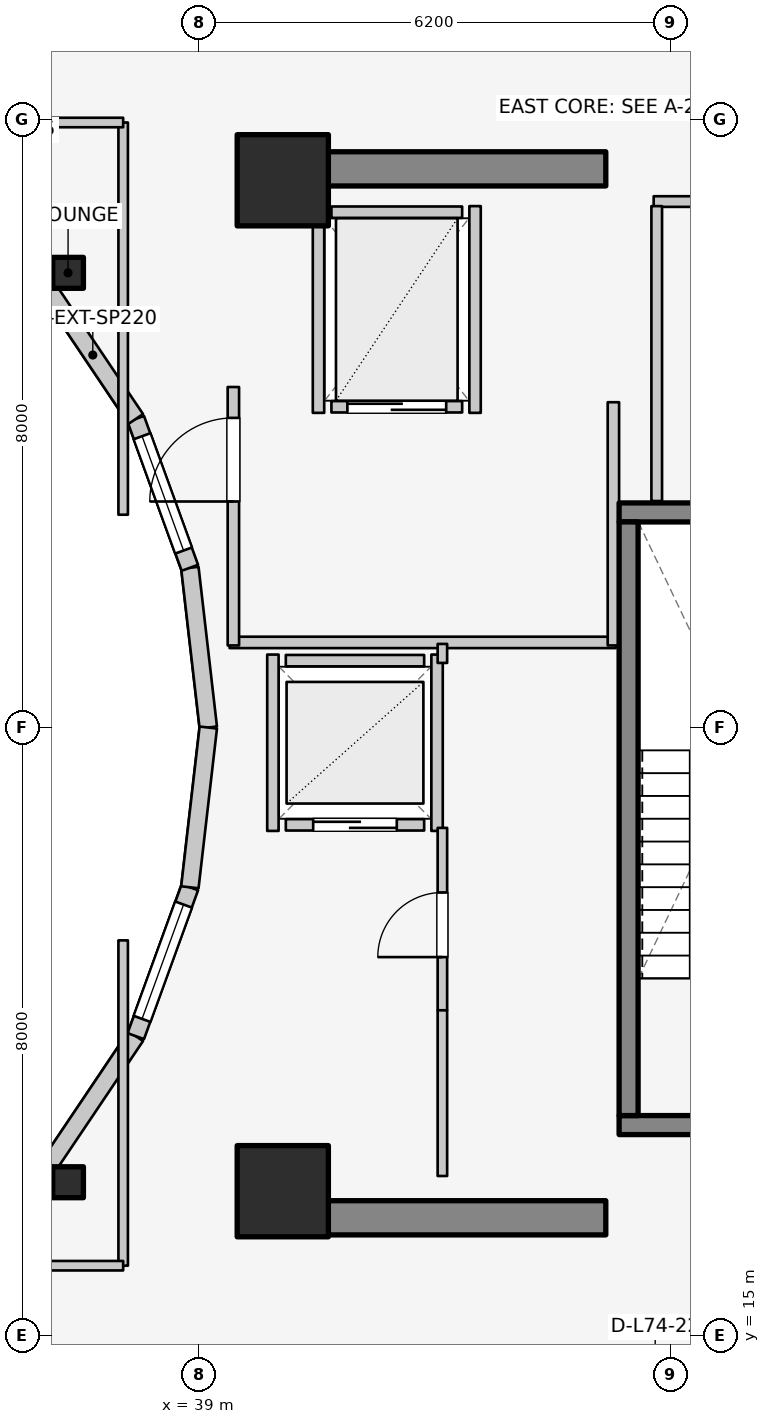
"""IFC4 building model, lengths in metres.
Left out: names, types, materials, properties, quantities, classifications, styles, units other than length and angle.
Written with IfcOpenShell. Run it as: python <this file> out.ifc"""

import sys

from ifc_helpers import new_model, si_unit, direction, frame, frame_2d, origin, origin_2d, place, context, subcontext, project, spatial, rectangle, i_section, extrude, element, fill, save


model = new_model("IFC4")
c1 = context("Model", 3, precision=1e-05, world=origin(), true_north=direction((0.0, 1.0)))
c2 = subcontext(c1, "Body", "Model", "MODEL_VIEW")
j1 = project(units=[si_unit("LENGTHUNIT", "METRE"), si_unit("PLANEANGLEUNIT", "RADIAN")], contexts=[c1])
p1 = place(None, origin())
s1 = spatial("IfcSite", under=j1, at=p1, CompositionType="ELEMENT")
p2 = place(p1, origin())
s2 = spatial("IfcBuilding", under=s1, at=p2, CompositionType="ELEMENT")
p3 = place(p2, frame((0.0, 0.0, 242.4)))
s3 = spatial("IfcBuildingStorey", under=s2, at=p3, CompositionType="ELEMENT", Elevation=242.4)
for number, where, z_axis, x_axis in (
    (1, (39.85, 16.55, 0.0), (0.0, 0.0, 1.0), (1.0, 0.0, 0.0)),
    (2, (39.85, 30.35, 0.0), (0.0, 0.0, 1.0), (1.0, 0.0, 0.0)),
):
    element("IfcWall", number, at=place(p3, frame(where, z_axis=z_axis, x_axis=x_axis)), inside=s3, PredefinedType="SHEAR", context=c2, shape_type="SweptSolid", body=[
        extrude(rectangle(XDim=4.5, YDim=0.45, at=frame_2d((2.25, 0.0))), origin(), (0.0, 0.0, 1.0), 3.6),
    ])
p4 = place(p3, frame((44.525, 17.77, 0.0), z_axis=(0.0, 0.0, 1.0), x_axis=(1.0, 0.0, 0.0)))
e3 = element("IfcWall", 3, at=p4, inside=s3, PredefinedType="SOLIDWALL", context=c2, shape_type="SweptSolid", body=[
    extrude(rectangle(XDim=3.37, YDim=0.25, at=frame_2d((1.685, 0.0))), origin(), (0.0, 0.0, 1.0), 3.6),
])
p5 = place(p4, frame((1.135, 0.0, 0.0)))
e4 = element("IfcOpeningElement", 4, at=p5, cuts=e3, PredefinedType="OPENING", context=c2, shape_type="SweptSolid", body=[
    extrude(rectangle(XDim=1.1, YDim=2.1, at=frame_2d((0.55, 1.05))), frame((0.0, 0.135, 0.0), z_axis=(0.0, -1.0, 0.0), x_axis=(1.0, 0.0, 0.0)), (0.0, 0.0, 1.0), 0.27),
])
p6 = place(p3, frame((44.525, 25.83, 0.0), z_axis=(0.0, 0.0, 1.0), x_axis=(1.0, 0.0, 0.0)))
e5 = element("IfcWall", 5, at=p6, inside=s3, PredefinedType="SOLIDWALL", context=c2, shape_type="SweptSolid", body=[
    extrude(rectangle(XDim=3.37, YDim=0.25, at=frame_2d((1.685, 0.0))), origin(), (0.0, 0.0, 1.0), 3.6),
])
p7 = place(p3, frame((44.65, 17.895, 0.0), z_axis=(0.0, 0.0, 1.0), x_axis=(0.0, 1.0, 0.0)))
e6 = element("IfcWall", 6, at=p7, inside=s3, PredefinedType="SOLIDWALL", context=c2, shape_type="SweptSolid", body=[
    extrude(rectangle(XDim=7.81, YDim=0.25, at=frame_2d((3.905, 0.0))), origin(), (0.0, 0.0, 1.0), 3.6),
])
for number, where, z_axis, x_axis in (
    (7, (40.1, 16.9, 0.0), (0.0, 0.0, 1.0), (1.0, 0.0, 0.0)),
    (8, (40.1, 30.2, 0.0), (0.0, 0.0, 1.0), (1.0, 0.0, 0.0)),
):
    element("IfcColumn", number, at=place(p3, frame(where, z_axis=z_axis, x_axis=x_axis)), inside=s3, PredefinedType="COLUMN", context=c2, shape_type="SweptSolid", body=[
        extrude(rectangle(XDim=1.2, YDim=1.2, at=origin_2d()), origin(), (0.0, 0.0, 1.0), 3.6),
    ])
for number, where, z_axis, x_axis in (
    (9, (37.275, 28.982, 0.0), (0.0, 0.0, 1.0), (1.0, 0.0, 0.0)),
    (10, (37.275, 17.018, 0.0), (0.0, 0.0, 1.0), (1.0, 0.0, 0.0)),
):
    element("IfcColumn", number, at=place(p3, frame(where, z_axis=z_axis, x_axis=x_axis)), inside=s3, PredefinedType="COLUMN", context=c2, shape_type="SweptSolid", body=[
        extrude(i_section(OverallWidth=0.404, OverallDepth=0.407, WebThickness=0.027, FlangeThickness=0.044, FilletRadius=0.025, at=origin_2d()), origin(), (0.0, 0.0, 1.0), 3.6),
    ])
p8 = place(p3, frame((39.12, 23.0, 0.0), z_axis=(0.0, 0.0, 1.0), x_axis=(-0.114711713601, 0.993398823617, 0.0)))
e11 = element("IfcWall", 11, at=p8, inside=s3, PredefinedType="STANDARD", context=c2, shape_type="SweptSolid", body=[
    extrude(rectangle(XDim=2.115, YDim=0.23, at=frame_2d((1.058, 0.0))), origin(), (0.0, 0.0, 1.0), 3.28),
])
p9 = place(p3, frame((38.877, 25.102, 0.0), z_axis=(0.0, 0.0, 1.0), x_axis=(-0.341423187295, 0.93990968033, 0.0)))
e12 = element("IfcWall", 12, at=p9, inside=s3, PredefinedType="STANDARD", context=c2, shape_type="SweptSolid", body=[
    extrude(rectangle(XDim=2.084, YDim=0.23, at=frame_2d((1.042, 0.0))), origin(), (0.0, 0.0, 1.0), 3.28),
])
p10 = place(p9, frame((0.242, 0.0, 0.85)))
e13 = element("IfcOpeningElement", 13, at=p10, cuts=e12, PredefinedType="OPENING", context=c2, shape_type="SweptSolid", body=[
    extrude(rectangle(XDim=1.6, YDim=1.65, at=frame_2d((0.8, 0.825))), frame((0.0, 0.125, 0.0), z_axis=(0.0, -1.0, 0.0), x_axis=(1.0, 0.0, 0.0)), (0.0, 0.0, 1.0), 0.25),
])
p11 = place(p3, frame((38.166, 27.06, 0.0), z_axis=(0.0, 0.0, 1.0), x_axis=(-0.558197800898, 0.829707909492, 0.0)))
e14 = element("IfcWall", 14, at=p11, inside=s3, PredefinedType="STANDARD", context=c2, shape_type="SweptSolid", body=[
    extrude(rectangle(XDim=2.027, YDim=0.23, at=frame_2d((1.013, 0.0))), origin(), (0.0, 0.0, 1.0), 2.6),
])
for number, where, z_axis, x_axis in (
    (15, (37.035, 28.742, 0.0), (0.0, 0.0, 1.0), (-0.753, 0.659, 0.0)),
    (16, (35.56, 15.968, 0.0), (0.0, 0.0, 1.0), (0.753, 0.659, 0.0)),
):
    element("IfcWall", number, at=place(p3, frame(where, z_axis=z_axis, x_axis=x_axis)), inside=s3, PredefinedType="STANDARD", context=c2, shape_type="SweptSolid", body=[
        extrude(rectangle(XDim=1.959, YDim=0.23, at=frame_2d((0.98, 0.0))), origin(), (0.0, 0.0, 1.0), 2.6),
    ])
p12 = place(p3, frame((37.035, 17.258, 0.0), z_axis=(0.0, 0.0, 1.0), x_axis=(0.558197800898, 0.829707909492, 0.0)))
e17 = element("IfcWall", 17, at=p12, inside=s3, PredefinedType="STANDARD", context=c2, shape_type="SweptSolid", body=[
    extrude(rectangle(XDim=2.027, YDim=0.23, at=frame_2d((1.013, 0.0))), origin(), (0.0, 0.0, 1.0), 2.6),
])
p13 = place(p3, frame((38.166, 18.94, 0.0), z_axis=(0.0, 0.0, 1.0), x_axis=(0.341423187295, 0.93990968033, 0.0)))
e18 = element("IfcWall", 18, at=p13, inside=s3, PredefinedType="STANDARD", context=c2, shape_type="SweptSolid", body=[
    extrude(rectangle(XDim=2.084, YDim=0.23, at=frame_2d((1.042, 0.0))), origin(), (0.0, 0.0, 1.0), 3.28),
])
p14 = place(p13, frame((0.242, 0.0, 0.85)))
e19 = element("IfcOpeningElement", 19, at=p14, cuts=e18, PredefinedType="OPENING", context=c2, shape_type="SweptSolid", body=[
    extrude(rectangle(XDim=1.6, YDim=1.65, at=frame_2d((0.8, 0.825))), frame((0.0, 0.125, 0.0), z_axis=(0.0, -1.0, 0.0), x_axis=(1.0, 0.0, 0.0)), (0.0, 0.0, 1.0), 0.25),
])
p15 = place(p3, frame((38.877, 20.898, 0.0), z_axis=(0.0, 0.0, 1.0), x_axis=(0.114711713601, 0.993398823617, 0.0)))
e20 = element("IfcWall", 20, at=p15, inside=s3, PredefinedType="STANDARD", context=c2, shape_type="SweptSolid", body=[
    extrude(rectangle(XDim=2.115, YDim=0.23, at=frame_2d((1.058, 0.0))), origin(), (0.0, 0.0, 1.0), 3.28),
])
p16 = place(p3, frame((40.14, 21.72, 0.0), z_axis=(0.0, 0.0, 1.0), x_axis=(1.0, 0.0, 0.0)))
e21 = element("IfcWall", 21, at=p16, inside=s3, PredefinedType="SOLIDWALL", context=c2, shape_type="SweptSolid", body=[
    extrude(rectangle(XDim=1.82, YDim=0.15, at=frame_2d((0.91, 0.0))), origin(), (0.0, 0.0, 1.0), 2.62),
])
p17 = place(p16, frame((0.36, 0.0, 0.0)))
e22 = element("IfcOpeningElement", 22, at=p17, cuts=e21, PredefinedType="OPENING", context=c2, shape_type="SweptSolid", body=[
    extrude(rectangle(XDim=1.1, YDim=2.1, at=frame_2d((0.55, 1.05))), frame((0.0, 0.085, 0.0), z_axis=(0.0, -1.0, 0.0), x_axis=(1.0, 0.0, 0.0)), (0.0, 0.0, 1.0), 0.17),
])
p18 = place(p3, frame((40.14, 23.88, 0.0), z_axis=(0.0, 0.0, 1.0), x_axis=(1.0, 0.0, 0.0)))
e23 = element("IfcWall", 23, at=p18, inside=s3, PredefinedType="SOLIDWALL", context=c2, shape_type="SweptSolid", body=[
    extrude(rectangle(XDim=1.82, YDim=0.15, at=frame_2d((0.91, 0.0))), origin(), (0.0, 0.0, 1.0), 2.62),
])
p19 = place(p3, frame((39.97, 21.64, 0.0), z_axis=(0.0, 0.0, 1.0), x_axis=(0.0, 1.0, 0.0)))
e24 = element("IfcWall", 24, at=p19, inside=s3, PredefinedType="SOLIDWALL", context=c2, shape_type="SweptSolid", body=[
    extrude(rectangle(XDim=2.32, YDim=0.15, at=frame_2d((1.16, 0.0))), origin(), (0.0, 0.0, 1.0), 2.62),
])
p20 = place(p3, frame((42.13, 21.64, 0.0), z_axis=(0.0, 0.0, 1.0), x_axis=(0.0, 1.0, 0.0)))
e25 = element("IfcWall", 25, at=p20, inside=s3, PredefinedType="SOLIDWALL", context=c2, shape_type="SweptSolid", body=[
    extrude(rectangle(XDim=2.32, YDim=0.15, at=frame_2d((1.16, 0.0))), origin(), (0.0, 0.0, 1.0), 3.295),
])
p21 = place(p3, frame((40.74, 27.22, 0.0), z_axis=(0.0, 0.0, 1.0), x_axis=(1.0, 0.0, 0.0)))
e26 = element("IfcWall", 26, at=p21, inside=s3, PredefinedType="SOLIDWALL", context=c2, shape_type="SweptSolid", body=[
    extrude(rectangle(XDim=1.72, YDim=0.15, at=frame_2d((0.86, 0.0))), origin(), (0.0, 0.0, 1.0), 3.295),
])
p22 = place(p21, frame((0.21, 0.0, 0.0)))
e27 = element("IfcOpeningElement", 27, at=p22, cuts=e26, PredefinedType="OPENING", context=c2, shape_type="SweptSolid", body=[
    extrude(rectangle(XDim=1.3, YDim=2.1, at=frame_2d((0.65, 1.05))), frame((0.0, 0.085, 0.0), z_axis=(0.0, -1.0, 0.0), x_axis=(1.0, 0.0, 0.0)), (0.0, 0.0, 1.0), 0.17),
])
p23 = place(p3, frame((40.74, 29.78, 0.0), z_axis=(0.0, 0.0, 1.0), x_axis=(1.0, 0.0, 0.0)))
e28 = element("IfcWall", 28, at=p23, inside=s3, PredefinedType="SOLIDWALL", context=c2, shape_type="SweptSolid", body=[
    extrude(rectangle(XDim=1.72, YDim=0.15, at=frame_2d((0.86, 0.0))), origin(), (0.0, 0.0, 1.0), 3.295),
])
for number, where, z_axis, x_axis in (
    (29, (40.57, 27.14, 0.0), (0.0, 0.0, 1.0), (0.0, 1.0, 0.0)),
    (30, (42.63, 27.14, 0.0), (0.0, 0.0, 1.0), (0.0, 1.0, 0.0)),
):
    element("IfcWall", number, at=place(p3, frame(where, z_axis=z_axis, x_axis=x_axis)), inside=s3, PredefinedType="SOLIDWALL", context=c2, shape_type="SweptSolid", body=[
        extrude(rectangle(XDim=2.72, YDim=0.15, at=frame_2d((1.36, 0.0))), origin(), (0.0, 0.0, 1.0), 3.295),
    ])
p24 = place(p3, frame((39.4, 24.12, 0.0), z_axis=(0.0, 0.0, 1.0), x_axis=(1.0, 0.0, 0.0)))
e31 = element("IfcWall", 31, at=p24, inside=s3, PredefinedType="PARTITIONING", context=c2, shape_type="SweptSolid", body=[
    extrude(rectangle(XDim=5.08, YDim=0.15, at=frame_2d((2.54, 0.0))), origin(), (0.0, 0.0, 1.0), 2.62),
])
p25 = place(p3, frame((44.45, 24.08, 0.0), z_axis=(0.0, 0.0, 1.0), x_axis=(0.0, 1.0, 0.0)))
e32 = element("IfcWall", 32, at=p25, inside=s3, PredefinedType="PARTITIONING", context=c2, shape_type="SweptSolid", body=[
    extrude(rectangle(XDim=3.2, YDim=0.15, at=frame_2d((1.6, 0.0))), origin(), (0.0, 0.0, 1.0), 3.295),
])
p26 = place(p3, frame((39.45, 24.08, 0.0), z_axis=(0.0, 0.0, 1.0), x_axis=(0.0, 1.0, 0.0)))
e33 = element("IfcWall", 33, at=p26, inside=s3, PredefinedType="PARTITIONING", context=c2, shape_type="SweptSolid", body=[
    extrude(rectangle(XDim=3.4, YDim=0.15, at=frame_2d((1.7, 0.0))), origin(), (0.0, 0.0, 1.0), 3.295),
])
p27 = place(p26, frame((1.894, 0.0, 0.0)))
e34 = element("IfcOpeningElement", 34, at=p27, cuts=e33, PredefinedType="OPENING", context=c2, shape_type="SweptSolid", body=[
    extrude(rectangle(XDim=1.1, YDim=2.1, at=frame_2d((0.55, 1.05))), frame((0.0, 0.085, 0.0), z_axis=(0.0, -1.0, 0.0), x_axis=(1.0, 0.0, 0.0)), (0.0, 0.0, 1.0), 0.17),
])
p28 = place(p3, frame((42.2, 19.28, 0.0), z_axis=(0.0, 0.0, 1.0), x_axis=(0.0, 1.0, 0.0)))
e35 = element("IfcWall", 35, at=p28, inside=s3, PredefinedType="PARTITIONING", context=c2, shape_type="SweptSolid", body=[
    extrude(rectangle(XDim=2.4, YDim=0.125, at=frame_2d((1.2, 0.0))), origin(), (0.0, 0.0, 1.0), 3.295),
])
p29 = place(p28, frame((0.7, 0.0, 0.0)))
e36 = element("IfcOpeningElement", 36, at=p29, cuts=e35, PredefinedType="OPENING", context=c2, shape_type="SweptSolid", body=[
    extrude(rectangle(XDim=0.85, YDim=2.05, at=frame_2d((0.425, 1.025))), frame((0.0, 0.073, 0.0), z_axis=(0.0, -1.0, 0.0), x_axis=(1.0, 0.0, 0.0)), (0.0, 0.0, 1.0), 0.145),
])
p30 = place(p3, frame((42.2, 23.85, 0.0), z_axis=(0.0, 0.0, 1.0), x_axis=(0.0, 1.0, 0.0)))
e37 = element("IfcWall", 37, at=p30, inside=s3, PredefinedType="PARTITIONING", context=c2, shape_type="SweptSolid", body=[
    extrude(rectangle(XDim=0.25, YDim=0.125, at=frame_2d((0.125, 0.0))), origin(), (0.0, 0.0, 1.0), 3.295),
])
p31 = place(p3, frame((42.2, 17.1, 0.0), z_axis=(0.0, 0.0, 1.0), x_axis=(0.0, 1.0, 0.0)))
e38 = element("IfcWall", 38, at=p31, inside=s3, PredefinedType="PARTITIONING", context=c2, shape_type="SweptSolid", body=[
    extrude(rectangle(XDim=2.18, YDim=0.125, at=frame_2d((1.09, 0.0))), origin(), (0.0, 0.0, 1.0), 3.295),
])
p32 = place(p3, frame((44.98, 29.92, 0.0), z_axis=(0.0, 0.0, 1.0), x_axis=(1.0, 0.0, 0.0)))
e39 = element("IfcWall", 39, at=p32, inside=s3, PredefinedType="PLUMBINGWALL", context=c2, shape_type="SweptSolid", body=[
    extrude(rectangle(XDim=2.9, YDim=0.14, at=frame_2d((1.45, 0.0))), origin(), (0.0, 0.0, 1.0), 3.295),
])
p33 = place(p32, frame((0.686, 0.0, 0.0)))
e40 = element("IfcOpeningElement", 40, at=p33, cuts=e39, PredefinedType="OPENING", context=c2, shape_type="SweptSolid", body=[
    extrude(rectangle(XDim=0.85, YDim=2.05, at=frame_2d((0.425, 1.025))), frame((0.0, 0.08, 0.0), z_axis=(0.0, -1.0, 0.0), x_axis=(1.0, 0.0, 0.0)), (0.0, 0.0, 1.0), 0.16),
])
p34 = place(p3, frame((45.02, 25.98, 0.0), z_axis=(0.0, 0.0, 1.0), x_axis=(0.0, 1.0, 0.0)))
e41 = element("IfcWall", 41, at=p34, inside=s3, PredefinedType="PLUMBINGWALL", context=c2, shape_type="SweptSolid", body=[
    extrude(rectangle(XDim=3.88, YDim=0.14, at=frame_2d((1.94, 0.0))), origin(), (0.0, 0.0, 1.0), 3.295),
])
p35 = place(p3, frame((35.55, 30.015, 0.0), z_axis=(0.0, 0.0, 1.0), x_axis=(0.523992004803, 0.851723182086, 0.0)))
e42 = element("IfcWall", 42, at=p35, inside=s3, PredefinedType="PARTITIONING", context=c2, shape_type="SweptSolid", body=[
    extrude(rectangle(XDim=3.101, YDim=0.125, at=frame_2d((1.551, 0.0))), origin(), (0.0, 0.0, 1.0), 2.672),
])
p36 = place(p3, frame((38.0, 25.8, 0.0), z_axis=(0.0, 0.0, 1.0), x_axis=(0.0, 1.0, 0.0)))
e43 = element("IfcWall", 43, at=p36, inside=s3, PredefinedType="PARTITIONING", context=c2, shape_type="SweptSolid", body=[
    extrude(rectangle(XDim=5.16, YDim=0.125, at=frame_2d((2.58, 0.0))), origin(), (0.0, 0.0, 1.0), 2.672),
])
p37 = place(p3, frame((35.4, 30.96, 0.0), z_axis=(0.0, 0.0, 1.0), x_axis=(1.0, 0.0, 0.0)))
e44 = element("IfcWall", 44, at=p37, inside=s3, PredefinedType="PARTITIONING", context=c2, shape_type="SweptSolid", body=[
    extrude(rectangle(XDim=2.6, YDim=0.125, at=frame_2d((1.3, 0.0))), origin(), (0.0, 0.0, 1.0), 2.816),
])
p38 = place(p3, frame((38.0, 15.92, 0.0), z_axis=(0.0, 0.0, 1.0), x_axis=(0.0, 1.0, 0.0)))
e45 = element("IfcWall", 45, at=p38, inside=s3, PredefinedType="PARTITIONING", context=c2, shape_type="SweptSolid", body=[
    extrude(rectangle(XDim=4.28, YDim=0.125, at=frame_2d((2.14, 0.0))), origin(), (0.0, 0.0, 1.0), 2.672),
])
p39 = place(p3, frame((35.4, 15.92, 0.0), z_axis=(0.0, 0.0, 1.0), x_axis=(1.0, 0.0, 0.0)))
e46 = element("IfcWall", 46, at=p39, inside=s3, PredefinedType="PARTITIONING", context=c2, shape_type="SweptSolid", body=[
    extrude(rectangle(XDim=2.6, YDim=0.125, at=frame_2d((1.3, 0.0))), origin(), (0.0, 0.0, 1.0), 2.672),
])
p40 = place(p10, origin())
e47 = element("IfcWindow", 47, at=p40, inside=s3, PartitioningType="SINGLE_PANEL", PredefinedType="WINDOW", context=c2, shape_type="SweptSolid", body=[
    extrude(rectangle(XDim=1.6, YDim=1.65, at=frame_2d((0.8, 0.825))), frame((0.0, 0.03, 0.0), z_axis=(0.0, -1.0, 0.0), x_axis=(1.0, 0.0, 0.0)), (0.0, 0.0, 1.0), 0.06),
])
fill(e13, e47)
p41 = place(p14, origin())
e48 = element("IfcWindow", 48, at=p41, inside=s3, PartitioningType="SINGLE_PANEL", PredefinedType="WINDOW", context=c2, shape_type="SweptSolid", body=[
    extrude(rectangle(XDim=1.6, YDim=1.65, at=frame_2d((0.8, 0.825))), frame((0.0, 0.03, 0.0), z_axis=(0.0, -1.0, 0.0), x_axis=(1.0, 0.0, 0.0)), (0.0, 0.0, 1.0), 0.06),
])
fill(e19, e48)
p42 = place(p17, origin())
e49 = element("IfcDoor", 49, at=p42, inside=s3, OperationType="DOUBLE_DOOR_SLIDING", PredefinedType="DOOR", context=c2, shape_type="SweptSolid", body=[
    extrude(rectangle(XDim=1.1, YDim=2.1, at=frame_2d((0.55, 1.05))), frame((0.0, 0.025, 0.0), z_axis=(0.0, -1.0, 0.0), x_axis=(1.0, 0.0, 0.0)), (0.0, 0.0, 1.0), 0.05),
])
fill(e22, e49)
p43 = place(p22, origin())
e50 = element("IfcDoor", 50, at=p43, inside=s3, OperationType="DOUBLE_DOOR_SLIDING", PredefinedType="DOOR", context=c2, shape_type="SweptSolid", body=[
    extrude(rectangle(XDim=1.3, YDim=2.1, at=frame_2d((0.65, 1.05))), frame((0.0, 0.025, 0.0), z_axis=(0.0, -1.0, 0.0), x_axis=(1.0, 0.0, 0.0)), (0.0, 0.0, 1.0), 0.05),
])
fill(e27, e50)
p44 = place(p27, origin())
e51 = element("IfcDoor", 51, at=p44, inside=s3, OperationType="SINGLE_SWING_LEFT", PredefinedType="DOOR", context=c2, shape_type="SweptSolid", body=[
    extrude(rectangle(XDim=1.1, YDim=2.1, at=frame_2d((0.55, 1.05))), frame((0.0, 0.025, 0.0), z_axis=(0.0, -1.0, 0.0), x_axis=(1.0, 0.0, 0.0)), (0.0, 0.0, 1.0), 0.05),
])
fill(e34, e51)
p45 = place(p29, origin())
e52 = element("IfcDoor", 52, at=p45, inside=s3, OperationType="SINGLE_SWING_LEFT", PredefinedType="DOOR", context=c2, shape_type="SweptSolid", body=[
    extrude(rectangle(XDim=0.85, YDim=2.05, at=frame_2d((0.425, 1.025))), frame((0.0, 0.025, 0.0), z_axis=(0.0, -1.0, 0.0), x_axis=(1.0, 0.0, 0.0)), (0.0, 0.0, 1.0), 0.05),
])
fill(e36, e52)
save(model, sys.argv[1])
